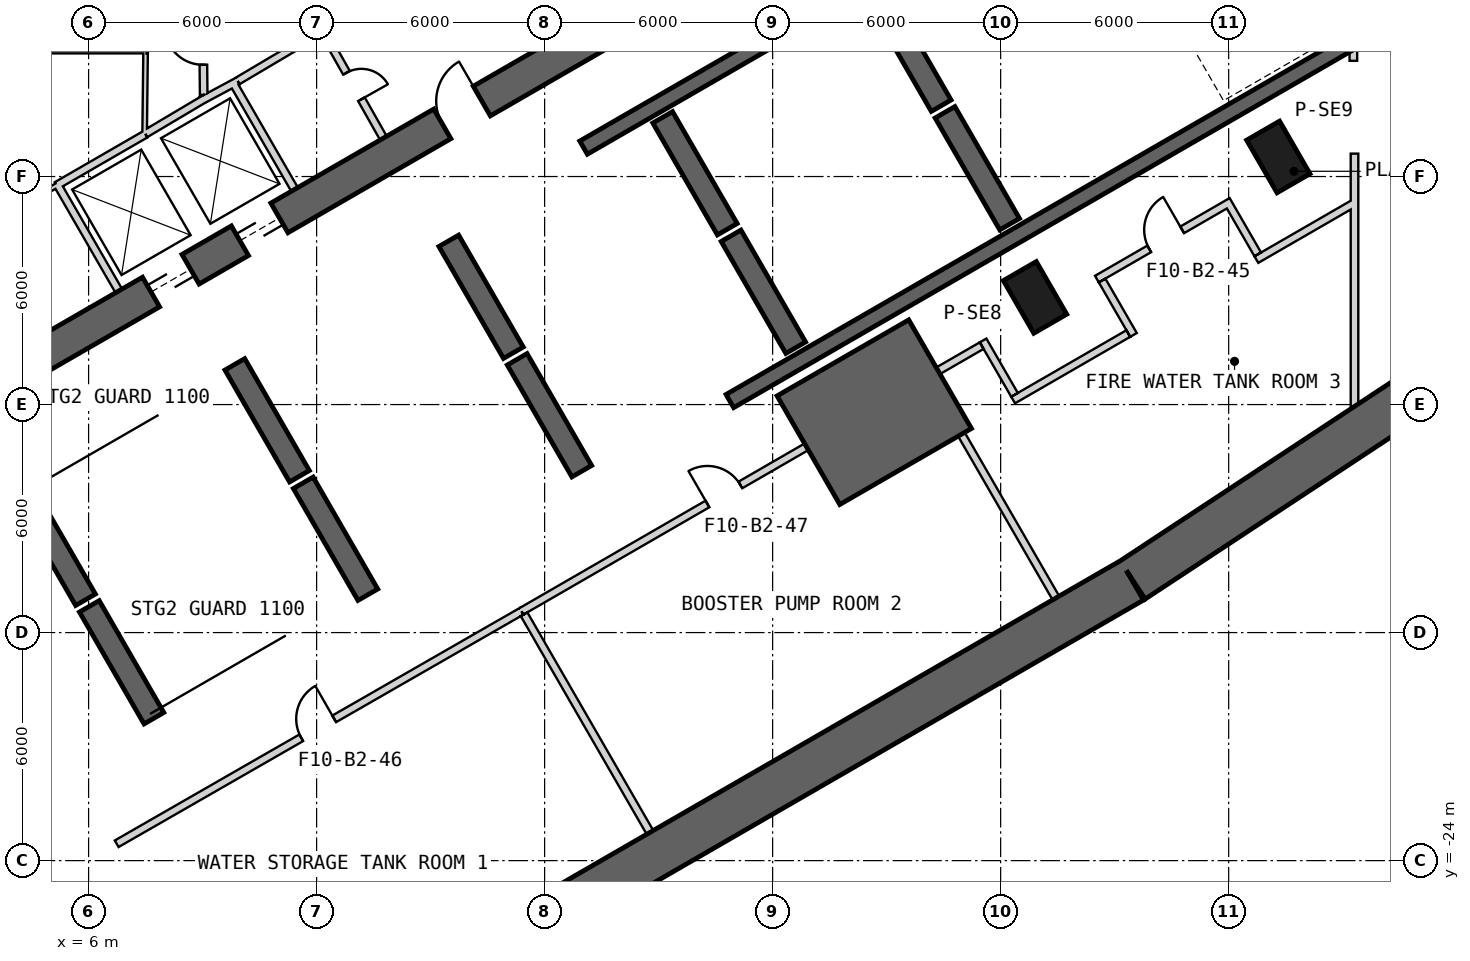
"""IFC4 building model, lengths in metres.
Left out: names, types, materials, properties, quantities, classifications, styles, units other than length and angle.
Written with IfcOpenShell. Run it as: python <this file> out.ifc"""

import sys

from ifc_helpers import new_model, si_unit, direction, frame, frame_2d, origin, origin_2d, place, context, subcontext, project, spatial, polyline, rectangle, outline, extrude, element, fill, save


model = new_model("IFC4")
c1 = context("Model", 3, precision=1e-05, world=origin(), true_north=direction((0.0, 1.0)))
c2 = subcontext(c1, "Body", "Model", "MODEL_VIEW")
j1 = project(units=[si_unit("LENGTHUNIT", "METRE"), si_unit("PLANEANGLEUNIT", "RADIAN")], contexts=[c1])
p1 = place(None, origin())
s1 = spatial("IfcSite", under=j1, at=p1, CompositionType="ELEMENT")
p2 = place(p1, origin())
s2 = spatial("IfcBuilding", under=s1, at=p2, CompositionType="ELEMENT")
p3 = place(p2, frame((0.0, 0.0, -11.0)))
s3 = spatial("IfcBuildingStorey", under=s2, at=p3, CompositionType="ELEMENT", Elevation=-11.0)
p4 = place(p3, frame((45.264, -8.845, -0.4), z_axis=(0.0, 0.0, 1.0), x_axis=(-0.834961815433, -0.550307883615, 0.0)))
e1 = element("IfcWall", 1, at=p4, inside=s3, PredefinedType="SHEAR", context=c2, shape_type="SweptSolid", body=[
    extrude(rectangle(XDim=14.122, YDim=1.2, at=frame_2d((7.061, 0.0))), origin(), (0.0, 0.0, 1.0), 5.9),
])
p5 = place(p3, frame((33.458, -16.625, -0.4), z_axis=(0.0, 0.0, 1.0), x_axis=(-0.865989988988, -0.500061335211, 0.0)))
e2 = element("IfcWall", 2, at=p5, inside=s3, PredefinedType="SHEAR", context=c2, shape_type="SweptSolid", body=[
    extrude(rectangle(XDim=41.324, YDim=1.2, at=frame_2d((20.662, 0.0))), origin(), (0.0, 0.0, 1.0), 5.9),
])
for number, where, z_axis, x_axis in (
    (3, (30.905, -9.181, -0.4), (0.0, 0.0, 1.0), (0.5, -0.866, 0.0)),
    (4, (37.306, -5.485, -0.4), (0.0, 0.0, 1.0), (0.5, -0.866, 0.0)),
):
    element("IfcColumn", number, at=place(p3, frame(where, z_axis=z_axis, x_axis=x_axis)), inside=s3, PredefinedType="COLUMN", context=c2, shape_type="SweptSolid", body=[
        extrude(rectangle(XDim=1.6, YDim=1.0, at=origin_2d()), origin(), (0.0, 0.0, 1.0), 5.9),
    ])
p6 = place(p3, frame((-7.825, -17.97, -0.4), z_axis=(0.0, 0.0, 1.0), x_axis=(0.866028369851, 0.499994862586, 0.0)))
e5 = element("IfcWall", 5, at=p6, inside=s3, PredefinedType="SHEAR", context=c2, shape_type="SweptSolid", body=[
    extrude(rectangle(XDim=31.523, YDim=0.9, at=frame_2d((15.762, 0.0))), origin(), (0.0, 0.0, 1.0), 5.9),
])
p7 = place(p6, frame((17.862, 0.0, 0.4)))
e6 = element("IfcOpeningElement", 6, at=p7, cuts=e5, PredefinedType="OPENING", context=c2, shape_type="SweptSolid", body=[
    extrude(rectangle(XDim=1.2, YDim=2.4, at=frame_2d((0.6, 1.2))), frame((0.0, 0.46, 0.0), z_axis=(0.0, -1.0, 0.0), x_axis=(1.0, 0.0, 0.0)), (0.0, 0.0, 1.0), 0.92),
])
p8 = place(p6, frame((20.562, 0.0, 0.4)))
e7 = element("IfcOpeningElement", 7, at=p8, cuts=e5, PredefinedType="OPENING", context=c2, shape_type="SweptSolid", body=[
    extrude(rectangle(XDim=1.2, YDim=2.4, at=frame_2d((0.6, 1.2))), frame((0.0, 0.46, 0.0), z_axis=(0.0, -1.0, 0.0), x_axis=(1.0, 0.0, 0.0)), (0.0, 0.0, 1.0), 0.92),
])
p9 = place(p6, frame((26.712, 0.0, 0.4)))
e8 = element("IfcOpeningElement", 8, at=p9, cuts=e5, PredefinedType="OPENING", context=c2, shape_type="SweptSolid", body=[
    extrude(rectangle(XDim=1.2, YDim=2.4, at=frame_2d((0.6, 1.2))), frame((0.0, 0.46, 0.0), z_axis=(0.0, -1.0, 0.0), x_axis=(1.0, 0.0, 0.0)), (0.0, 0.0, 1.0), 0.92),
])
p10 = place(p6, frame((3.612, 0.0, 0.4)))
e9 = element("IfcOpeningElement", 9, at=p10, cuts=e5, PredefinedType="OPENING", context=c2, shape_type="SweptSolid", body=[
    extrude(rectangle(XDim=1.2, YDim=2.4, at=frame_2d((0.6, 1.2))), frame((0.0, 0.46, 0.0), z_axis=(0.0, -1.0, 0.0), x_axis=(1.0, 0.0, 0.0)), (0.0, 0.0, 1.0), 0.92),
])
p11 = place(p3, frame((26.736, -1.192, -0.4), z_axis=(0.0, 0.0, 1.0), x_axis=(0.499977295307, -0.866038511948, 0.0)))
e10 = element("IfcWall", 10, at=p11, inside=s3, PredefinedType="STANDARD", context=c2, shape_type="SweptSolid", body=[
    extrude(rectangle(XDim=3.4, YDim=0.6, at=frame_2d((1.7, 0.0))), origin(), (0.0, 0.0, 1.0), 1.307),
])
p12 = place(p3, frame((21.107, -4.442, -0.4), z_axis=(0.0, 0.0, 1.0), x_axis=(0.500031147688, -0.866007419912, 0.0)))
e11 = element("IfcWall", 11, at=p12, inside=s3, PredefinedType="STANDARD", context=c2, shape_type="SweptSolid", body=[
    extrude(rectangle(XDim=3.4, YDim=0.6, at=frame_2d((1.7, 0.0))), origin(), (0.0, 0.0, 1.0), 2.236),
])
p13 = place(p3, frame((15.478, -7.692, -0.4), z_axis=(0.0, 0.0, 1.0), x_axis=(0.499977295307, -0.866038511948, 0.0)))
e12 = element("IfcWall", 12, at=p13, inside=s3, PredefinedType="STANDARD", context=c2, shape_type="SweptSolid", body=[
    extrude(rectangle(XDim=3.4, YDim=0.6, at=frame_2d((1.7, 0.0))), origin(), (0.0, 0.0, 1.0), 3.164),
])
p14 = place(p3, frame((9.848, -10.942, -0.4), z_axis=(0.0, 0.0, 1.0), x_axis=(0.499977295307, -0.866038511948, 0.0)))
e13 = element("IfcWall", 13, at=p14, inside=s3, PredefinedType="STANDARD", context=c2, shape_type="SweptSolid", body=[
    extrude(rectangle(XDim=3.4, YDim=0.6, at=frame_2d((1.7, 0.0))), origin(), (0.0, 0.0, 1.0), 4.093),
])
p15 = place(p3, frame((4.219, -14.192, -0.4), z_axis=(0.0, 0.0, 1.0), x_axis=(0.499977295307, -0.866038511948, 0.0)))
e14 = element("IfcWall", 14, at=p15, inside=s3, PredefinedType="STANDARD", context=c2, shape_type="SweptSolid", body=[
    extrude(rectangle(XDim=3.4, YDim=0.6, at=frame_2d((1.7, 0.0))), origin(), (0.0, 0.0, 1.0), 5.021),
])
p16 = place(p3, frame((28.536, -4.309, -0.4), z_axis=(0.0, 0.0, 1.0), x_axis=(0.499977295307, -0.866038511948, 0.0)))
e15 = element("IfcWall", 15, at=p16, inside=s3, PredefinedType="STANDARD", context=c2, shape_type="SweptSolid", body=[
    extrude(rectangle(XDim=3.4, YDim=0.6, at=frame_2d((1.7, 0.0))), origin(), (0.0, 0.0, 1.0), 1.307),
])
p17 = place(p3, frame((22.907, -7.559, -0.4), z_axis=(0.0, 0.0, 1.0), x_axis=(0.499977295307, -0.866038511948, 0.0)))
e16 = element("IfcWall", 16, at=p17, inside=s3, PredefinedType="STANDARD", context=c2, shape_type="SweptSolid", body=[
    extrude(rectangle(XDim=3.4, YDim=0.6, at=frame_2d((1.7, 0.0))), origin(), (0.0, 0.0, 1.0), 2.236),
])
p18 = place(p3, frame((17.278, -10.809, -0.4), z_axis=(0.0, 0.0, 1.0), x_axis=(0.499977295307, -0.866038511948, 0.0)))
e17 = element("IfcWall", 17, at=p18, inside=s3, PredefinedType="STANDARD", context=c2, shape_type="SweptSolid", body=[
    extrude(rectangle(XDim=3.4, YDim=0.6, at=frame_2d((1.7, 0.0))), origin(), (0.0, 0.0, 1.0), 3.164),
])
p19 = place(p3, frame((11.648, -14.059, -0.4), z_axis=(0.0, 0.0, 1.0), x_axis=(0.499977295307, -0.866038511948, 0.0)))
e18 = element("IfcWall", 18, at=p19, inside=s3, PredefinedType="STANDARD", context=c2, shape_type="SweptSolid", body=[
    extrude(rectangle(XDim=3.4, YDim=0.6, at=frame_2d((1.7, 0.0))), origin(), (0.0, 0.0, 1.0), 4.093),
])
p20 = place(p3, frame((6.019, -17.309, -0.4), z_axis=(0.0, 0.0, 1.0), x_axis=(0.499977295307, -0.866038511948, 0.0)))
e19 = element("IfcWall", 19, at=p20, inside=s3, PredefinedType="STANDARD", context=c2, shape_type="SweptSolid", body=[
    extrude(rectangle(XDim=3.4, YDim=0.6, at=frame_2d((1.7, 0.0))), origin(), (0.0, 0.0, 1.0), 5.021),
])
p21 = place(p3, frame((22.875, -11.908, -0.4), z_axis=(0.0, 0.0, 1.0), x_axis=(0.866022361258, 0.500005269773, 0.0)))
e20 = element("IfcWall", 20, at=p21, inside=s3, PredefinedType="SHEAR", context=c2, shape_type="SweptSolid", body=[
    extrude(rectangle(XDim=19.702, YDim=0.4, at=frame_2d((9.851, 0.0))), origin(), (0.0, 0.0, 1.0), 5.5),
])
p22 = place(p3, frame((36.087, 4.611, -0.4), z_axis=(0.0, 0.0, 1.0), x_axis=(-0.866024629043, -0.500001341888, 0.0)))
e21 = element("IfcWall", 21, at=p22, inside=s3, PredefinedType="SHEAR", context=c2, shape_type="SweptSolid", body=[
    extrude(rectangle(XDim=19.702, YDim=0.4, at=frame_2d((9.851, 0.0))), origin(), (0.0, 0.0, 1.0), 5.5),
])
p23 = place(p3, frame((0.0, 0.0, -0.4)))
e22 = element("IfcWall", 22, at=p23, inside=s3, PredefinedType="SHEAR", context=c2, shape_type="SweptSolid", body=[
    extrude(outline(polyline([(25.767, -14.63), (29.231, -12.63), (27.581, -9.772), (24.117, -11.772), (25.767, -14.63)])), origin(), (0.0, 0.0, 1.0), 5.9),
])
p24 = place(p3, frame((6.795, -9.01, 0.0), z_axis=(0.0, 0.0, 1.0), x_axis=(-0.499984717929, 0.866034226713, 0.0)))
e23 = element("IfcWall", 23, at=p24, inside=s3, PredefinedType="PLUMBINGWALL", context=c2, shape_type="SweptSolid", body=[
    extrude(rectangle(XDim=3.25, YDim=0.2, at=frame_2d((1.625, 0.0))), origin(), (0.0, 0.0, 1.0), 5.1),
])
p25 = place(p3, frame((5.159, -6.236, 0.0), z_axis=(0.0, 0.0, 1.0), x_axis=(0.866036505625, 0.499980770555, 0.0)))
e24 = element("IfcWall", 24, at=p25, inside=s3, PredefinedType="PLUMBINGWALL", context=c2, shape_type="SweptSolid", body=[
    extrude(rectangle(XDim=2.7, YDim=0.2, at=frame_2d((1.35, 0.0))), origin(), (0.0, 0.0, 1.0), 5.1),
])
p26 = place(p3, frame((9.795, -3.525, 0.0), z_axis=(0.0, 0.0, 1.0), x_axis=(0.499984717929, -0.866034226713, 0.0)))
e25 = element("IfcWall", 25, at=p26, inside=s3, PredefinedType="PLUMBINGWALL", context=c2, shape_type="SweptSolid", body=[
    extrude(rectangle(XDim=3.25, YDim=0.2, at=frame_2d((1.625, 0.0))), origin(), (0.0, 0.0, 1.0), 5.1),
])
p27 = place(p3, frame((8.974, -3.999, 0.0), z_axis=(0.0, 0.0, 1.0), x_axis=(0.880907015104, 0.473289373154, 0.0)))
e26 = element("IfcWall", 26, at=p27, inside=s3, PredefinedType="PLUMBINGWALL", context=c2, shape_type="SweptSolid", body=[
    extrude(rectangle(XDim=1.078, YDim=0.2, at=frame_2d((0.539, 0.0))), origin(), (0.0, 0.0, 1.0), 5.1),
])
p28 = place(p3, frame((7.493, -4.878, 0.0), z_axis=(0.0, 0.0, 1.0), x_axis=(0.859981807212, 0.510324691999, 0.0)))
e27 = element("IfcWall", 27, at=p28, inside=s3, PredefinedType="PLUMBINGWALL", context=c2, shape_type="SweptSolid", body=[
    extrude(rectangle(XDim=1.845, YDim=0.2, at=frame_2d((0.922, 0.0))), origin(), (0.0, 0.0, 1.0), 5.1),
])
p29 = place(p3, frame((0.483, -8.936, 0.0), z_axis=(0.0, 0.0, 1.0), x_axis=(0.866028230842, 0.499995103361, 0.0)))
e28 = element("IfcWall", 28, at=p29, inside=s3, PredefinedType="PARTITIONING", context=c2, shape_type="SweptSolid", body=[
    extrude(rectangle(XDim=5.4, YDim=0.12, at=frame_2d((2.7, 0.0))), origin(), (0.0, 0.0, 1.0), 5.1),
])
p30 = place(p29, frame((2.3, 0.0, 0.0)))
e29 = element("IfcOpeningElement", 29, at=p30, cuts=e28, PredefinedType="OPENING", context=c2, shape_type="SweptSolid", body=[
    extrude(rectangle(XDim=0.8, YDim=2.1, at=frame_2d((0.4, 1.05))), frame((0.0, 0.07, 0.0), z_axis=(0.0, -1.0, 0.0), x_axis=(1.0, 0.0, 0.0)), (0.0, 0.0, 1.0), 0.14),
])
p31 = place(p3, frame((12.245, -2.109, 0.0), z_axis=(0.0, 0.0, 1.0), x_axis=(-0.860414880418, -0.509594185166, 0.0)))
e30 = element("IfcWall", 30, at=p31, inside=s3, PredefinedType="PARTITIONING", context=c2, shape_type="SweptSolid", body=[
    extrude(rectangle(XDim=2.7, YDim=0.2, at=frame_2d((1.35, 0.0))), origin(), (0.0, 0.0, 1.0), 5.1),
])
p32 = place(p3, frame((13.758, -4.99, 0.0), z_axis=(0.0, 0.0, 1.0), x_axis=(-0.491993409184, 0.87059892334, 0.0)))
e31 = element("IfcWall", 31, at=p32, inside=s3, PredefinedType="PARTITIONING", context=c2, shape_type="SweptSolid", body=[
    extrude(rectangle(XDim=3.15, YDim=0.2, at=frame_2d((1.575, 0.0))), origin(), (0.0, 0.0, 1.0), 5.1),
])
p33 = place(p32, frame((1.175, 0.0, 0.0)))
e32 = element("IfcOpeningElement", 32, at=p33, cuts=e31, PredefinedType="OPENING", context=c2, shape_type="SweptSolid", body=[
    extrude(rectangle(XDim=0.8, YDim=2.1, at=frame_2d((0.4, 1.05))), frame((0.0, 0.11, 0.0), z_axis=(0.0, -1.0, 0.0), x_axis=(1.0, 0.0, 0.0)), (0.0, 0.0, 1.0), 0.22),
])
p34 = place(p3, frame((9.029, -3.851, 0.0), z_axis=(0.0, 0.0, 1.0), x_axis=(-0.010783593937, 0.99994185536, 0.0)))
e33 = element("IfcWall", 33, at=p34, inside=s3, PredefinedType="PARTITIONING", context=c2, shape_type="SweptSolid", body=[
    extrude(rectangle(XDim=2.581, YDim=0.2, at=frame_2d((1.291, 0.0))), origin(), (0.0, 0.0, 1.0), 5.1),
])
p35 = place(p34, frame((0.791, 0.0, 0.0)))
e34 = element("IfcOpeningElement", 34, at=p35, cuts=e33, PredefinedType="OPENING", context=c2, shape_type="SweptSolid", body=[
    extrude(rectangle(XDim=1.0, YDim=2.1, at=frame_2d((0.5, 1.05))), frame((0.0, 0.11, 0.0), z_axis=(0.0, -1.0, 0.0), x_axis=(1.0, 0.0, 0.0)), (0.0, 0.0, 1.0), 0.22),
])
p36 = place(p3, frame((7.56, -2.7, 0.0), z_axis=(0.0, 0.0, 1.0), x_axis=(-1.0, 0.0, 0.0)))
e35 = element("IfcWall", 35, at=p36, inside=s3, PredefinedType="PARTITIONING", context=c2, shape_type="SweptSolid", body=[
    extrude(rectangle(XDim=3.0, YDim=0.12, at=frame_2d((1.5, 0.0))), origin(), (0.0, 0.0, 1.0), 5.1),
])
p37 = place(p3, frame((7.475, -4.865, 0.0), z_axis=(0.0, 0.0, 1.0), x_axis=(0.011716133148, 0.999931363757, 0.0)))
e36 = element("IfcWall", 36, at=p37, inside=s3, PredefinedType="PARTITIONING", context=c2, shape_type="SweptSolid", body=[
    extrude(rectangle(XDim=2.105, YDim=0.12, at=frame_2d((1.052, 0.0))), origin(), (0.0, 0.0, 1.0), 5.1),
])
p38 = place(p3, frame((39.311, -6.697, 0.0), z_axis=(0.0, 0.0, 1.0), x_axis=(0.0, 1.0, 0.0)))
e37 = element("IfcWall", 37, at=p38, inside=s3, PredefinedType="PARTITIONING", context=c2, shape_type="SweptSolid", body=[
    extrude(rectangle(XDim=1.3, YDim=0.2, at=frame_2d((0.65, 0.0))), origin(), (0.0, 0.0, 1.0), 5.1),
])
p39 = place(p3, frame((39.281, -2.955, 0.0), z_axis=(0.0, 0.0, 1.0), x_axis=(0.0, 1.0, 0.0)))
e38 = element("IfcWall", 38, at=p39, inside=s3, PredefinedType="PARTITIONING", context=c2, shape_type="SweptSolid", body=[
    extrude(rectangle(XDim=0.75, YDim=0.2, at=frame_2d((0.375, 0.0))), origin(), (0.0, 0.0, 1.0), 5.1),
])
p40 = place(p3, frame((39.311, -6.697, 0.0), z_axis=(0.0, 0.0, 1.0), x_axis=(0.0, -1.0, 0.0)))
e39 = element("IfcWall", 39, at=p40, inside=s3, PredefinedType="PARTITIONING", context=c2, shape_type="SweptSolid", body=[
    extrude(rectangle(XDim=5.388, YDim=0.2, at=frame_2d((2.694, 0.0))), origin(), (0.0, 0.0, 1.0), 5.1),
])
p41 = place(p3, frame((6.739, -23.556, 0.0), z_axis=(0.0, 0.0, 1.0), x_axis=(0.867232277188, 0.497903783279, 0.0)))
e40 = element("IfcWall", 40, at=p41, inside=s3, PredefinedType="PARTITIONING", context=c2, shape_type="SweptSolid", body=[
    extrude(rectangle(XDim=12.283, YDim=0.2, at=frame_2d((6.142, 0.0))), origin(), (0.0, 0.0, 1.0), 5.1),
])
p42 = place(p41, frame((5.6, 0.0, 0.0)))
e41 = element("IfcOpeningElement", 41, at=p42, cuts=e40, PredefinedType="OPENING", context=c2, shape_type="SweptSolid", body=[
    extrude(rectangle(XDim=1.0, YDim=2.1, at=frame_2d((0.5, 1.05))), frame((0.0, 0.11, 0.0), z_axis=(0.0, -1.0, 0.0), x_axis=(1.0, 0.0, 0.0)), (0.0, 0.0, 1.0), 0.22),
])
p43 = place(p3, frame((17.392, -17.441, 0.0), z_axis=(0.0, 0.0, 1.0), x_axis=(0.866022182542, 0.500005579313, 0.0)))
e42 = element("IfcWall", 42, at=p43, inside=s3, PredefinedType="PARTITIONING", context=c2, shape_type="SweptSolid", body=[
    extrude(rectangle(XDim=8.659, YDim=0.2, at=frame_2d((4.329, 0.0))), origin(), (0.0, 0.0, 1.0), 5.1),
])
p44 = place(p43, frame((5.65, 0.0, 0.0)))
e43 = element("IfcOpeningElement", 43, at=p44, cuts=e42, PredefinedType="OPENING", context=c2, shape_type="SweptSolid", body=[
    extrude(rectangle(XDim=1.0, YDim=2.1, at=frame_2d((0.5, 1.05))), frame((0.0, 0.11, 0.0), z_axis=(0.0, -1.0, 0.0), x_axis=(1.0, 0.0, 0.0)), (0.0, 0.0, 1.0), 0.22),
])
p45 = place(p3, frame((28.354, -11.111, 0.0), z_axis=(0.0, 0.0, 1.0), x_axis=(0.866056658381, 0.499945861543, 0.0)))
e44 = element("IfcWall", 44, at=p45, inside=s3, PredefinedType="PARTITIONING", context=c2, shape_type="SweptSolid", body=[
    extrude(rectangle(XDim=1.324, YDim=0.2, at=frame_2d((0.662, 0.0))), origin(), (0.0, 0.0, 1.0), 5.1),
])
p46 = place(p3, frame((32.532, -8.699, 0.0), z_axis=(0.0, 0.0, 1.0), x_axis=(0.866018425233, 0.500012087011, 0.0)))
e45 = element("IfcWall", 45, at=p46, inside=s3, PredefinedType="PARTITIONING", context=c2, shape_type="SweptSolid", body=[
    extrude(rectangle(XDim=3.892, YDim=0.2, at=frame_2d((1.946, 0.0))), origin(), (0.0, 0.0, 1.0), 5.1),
])
p47 = place(p46, frame((1.591, 0.0, 0.0)))
e46 = element("IfcOpeningElement", 46, at=p47, cuts=e45, PredefinedType="OPENING", context=c2, shape_type="SweptSolid", body=[
    extrude(rectangle(XDim=1.0, YDim=2.1, at=frame_2d((0.5, 1.05))), frame((0.0, 0.11, 0.0), z_axis=(0.0, -1.0, 0.0), x_axis=(1.0, 0.0, 0.0)), (0.0, 0.0, 1.0), 0.22),
])
p48 = place(p3, frame((30.328, -11.881, 0.0), z_axis=(0.0, 0.0, 1.0), x_axis=(0.866019471182, 0.500010275428, 0.0)))
e47 = element("IfcWall", 47, at=p48, inside=s3, PredefinedType="PARTITIONING", context=c2, shape_type="SweptSolid", body=[
    extrude(rectangle(XDim=3.5, YDim=0.2, at=frame_2d((1.75, 0.0))), origin(), (0.0, 0.0, 1.0), 5.1),
])
p49 = place(p3, frame((36.729, -8.186, 0.0), z_axis=(0.0, 0.0, 1.0), x_axis=(0.865999269783, 0.500045262687, 0.0)))
e48 = element("IfcWall", 48, at=p49, inside=s3, PredefinedType="PARTITIONING", context=c2, shape_type="SweptSolid", body=[
    extrude(rectangle(XDim=3.011, YDim=0.2, at=frame_2d((1.506, 0.0))), origin(), (0.0, 0.0, 1.0), 5.1),
])
for number, where, z_axis, x_axis in (
    (49, (36.766, -8.049, 0.0), (0.0, 0.0, 1.0), (-0.5, 0.866, 0.0)),
    (50, (33.496, -10.168, 0.0), (0.0, 0.0, 1.0), (-0.5, 0.866, 0.0)),
):
    element("IfcWall", number, at=place(p3, frame(where, z_axis=z_axis, x_axis=x_axis)), inside=s3, PredefinedType="PARTITIONING", context=c2, shape_type="SweptSolid", body=[
        extrude(rectangle(XDim=1.653, YDim=0.2, at=frame_2d((0.827, 0.0))), origin(), (0.0, 0.0, 1.0), 5.1),
    ])
p50 = place(p3, frame((30.365, -11.745, 0.0), z_axis=(0.0, 0.0, 1.0), x_axis=(-0.499918423778, 0.866072496716, 0.0)))
e51 = element("IfcWall", 51, at=p50, inside=s3, PredefinedType="PARTITIONING", context=c2, shape_type="SweptSolid", body=[
    extrude(rectangle(XDim=1.654, YDim=0.2, at=frame_2d((0.827, 0.0))), origin(), (0.0, 0.0, 1.0), 5.1),
])
p51 = place(p3, frame((20.773, -23.257, 0.0), z_axis=(0.0, 0.0, 1.0), x_axis=(-0.499997729706, 0.866026714536, 0.0)))
e52 = element("IfcWall", 52, at=p51, inside=s3, PredefinedType="PARTITIONING", context=c2, shape_type="SweptSolid", body=[
    extrude(rectangle(XDim=6.628, YDim=0.2, at=frame_2d((3.314, 0.0))), origin(), (0.0, 0.0, 1.0), 5.1),
])
p52 = place(p3, frame((31.454, -17.09, 0.0), z_axis=(0.0, 0.0, 1.0), x_axis=(-0.49999297576, 0.866029459193, 0.0)))
e53 = element("IfcWall", 53, at=p52, inside=s3, PredefinedType="PARTITIONING", context=c2, shape_type="SweptSolid", body=[
    extrude(rectangle(XDim=4.974, YDim=0.2, at=frame_2d((2.487, 0.0))), origin(), (0.0, 0.0, 1.0), 5.1),
])
p53 = place(p35, origin())
e54 = element("IfcDoor", 54, at=p53, inside=s3, OperationType="SINGLE_SWING_RIGHT", PredefinedType="USERDEFINED", context=c2, shape_type="SweptSolid", body=[
    extrude(rectangle(XDim=1.0, YDim=2.1, at=frame_2d((0.5, 1.05))), frame((0.0, 0.025, 0.0), z_axis=(0.0, -1.0, 0.0), x_axis=(1.0, 0.0, 0.0)), (0.0, 0.0, 1.0), 0.05),
])
fill(e34, e54)
p54 = place(p33, origin())
e55 = element("IfcDoor", 55, at=p54, inside=s3, OperationType="SINGLE_SWING_LEFT", PredefinedType="USERDEFINED", context=c2, shape_type="SweptSolid", body=[
    extrude(rectangle(XDim=0.8, YDim=2.1, at=frame_2d((0.4, 1.05))), frame((0.0, 0.025, 0.0), z_axis=(0.0, -1.0, 0.0), x_axis=(1.0, 0.0, 0.0)), (0.0, 0.0, 1.0), 0.05),
])
fill(e32, e55)
p55 = place(p47, origin())
e56 = element("IfcDoor", 56, at=p55, inside=s3, OperationType="SINGLE_SWING_RIGHT", PredefinedType="USERDEFINED", context=c2, shape_type="SweptSolid", body=[
    extrude(rectangle(XDim=1.0, YDim=2.1, at=frame_2d((0.5, 1.05))), frame((0.0, 0.025, 0.0), z_axis=(0.0, -1.0, 0.0), x_axis=(1.0, 0.0, 0.0)), (0.0, 0.0, 1.0), 0.05),
])
fill(e46, e56)
p56 = place(p42, origin())
e57 = element("IfcDoor", 57, at=p56, inside=s3, OperationType="SINGLE_SWING_RIGHT", PredefinedType="USERDEFINED", context=c2, shape_type="SweptSolid", body=[
    extrude(rectangle(XDim=1.0, YDim=2.1, at=frame_2d((0.5, 1.05))), frame((0.0, 0.025, 0.0), z_axis=(0.0, -1.0, 0.0), x_axis=(1.0, 0.0, 0.0)), (0.0, 0.0, 1.0), 0.05),
])
fill(e41, e57)
p57 = place(p44, origin())
e58 = element("IfcDoor", 58, at=p57, inside=s3, OperationType="SINGLE_SWING_LEFT", PredefinedType="USERDEFINED", context=c2, shape_type="SweptSolid", body=[
    extrude(rectangle(XDim=1.0, YDim=2.1, at=frame_2d((0.5, 1.05))), frame((0.0, 0.025, 0.0), z_axis=(0.0, -1.0, 0.0), x_axis=(1.0, 0.0, 0.0)), (0.0, 0.0, 1.0), 0.05),
])
fill(e43, e58)
p58 = place(p7, origin())
e59 = element("IfcDoor", 59, at=p58, inside=s3, OperationType="SLIDING_TO_LEFT", PredefinedType="USERDEFINED", context=c2, shape_type="SweptSolid", body=[
    extrude(rectangle(XDim=1.2, YDim=2.4, at=frame_2d((0.6, 1.2))), frame((0.0, 0.025, 0.0), z_axis=(0.0, -1.0, 0.0), x_axis=(1.0, 0.0, 0.0)), (0.0, 0.0, 1.0), 0.05),
])
fill(e6, e59)
p59 = place(p8, origin())
e60 = element("IfcDoor", 60, at=p59, inside=s3, OperationType="SLIDING_TO_LEFT", PredefinedType="USERDEFINED", context=c2, shape_type="SweptSolid", body=[
    extrude(rectangle(XDim=1.2, YDim=2.4, at=frame_2d((0.6, 1.2))), frame((0.0, 0.025, 0.0), z_axis=(0.0, -1.0, 0.0), x_axis=(1.0, 0.0, 0.0)), (0.0, 0.0, 1.0), 0.05),
])
fill(e7, e60)
p60 = place(p9, origin())
e61 = element("IfcDoor", 61, at=p60, inside=s3, OperationType="SINGLE_SWING_RIGHT", PredefinedType="USERDEFINED", context=c2, shape_type="SweptSolid", body=[
    extrude(rectangle(XDim=1.2, YDim=2.4, at=frame_2d((0.6, 1.2))), frame((0.0, 0.025, 0.0), z_axis=(0.0, -1.0, 0.0), x_axis=(1.0, 0.0, 0.0)), (0.0, 0.0, 1.0), 0.05),
])
fill(e8, e61)
save(model, sys.argv[1])
